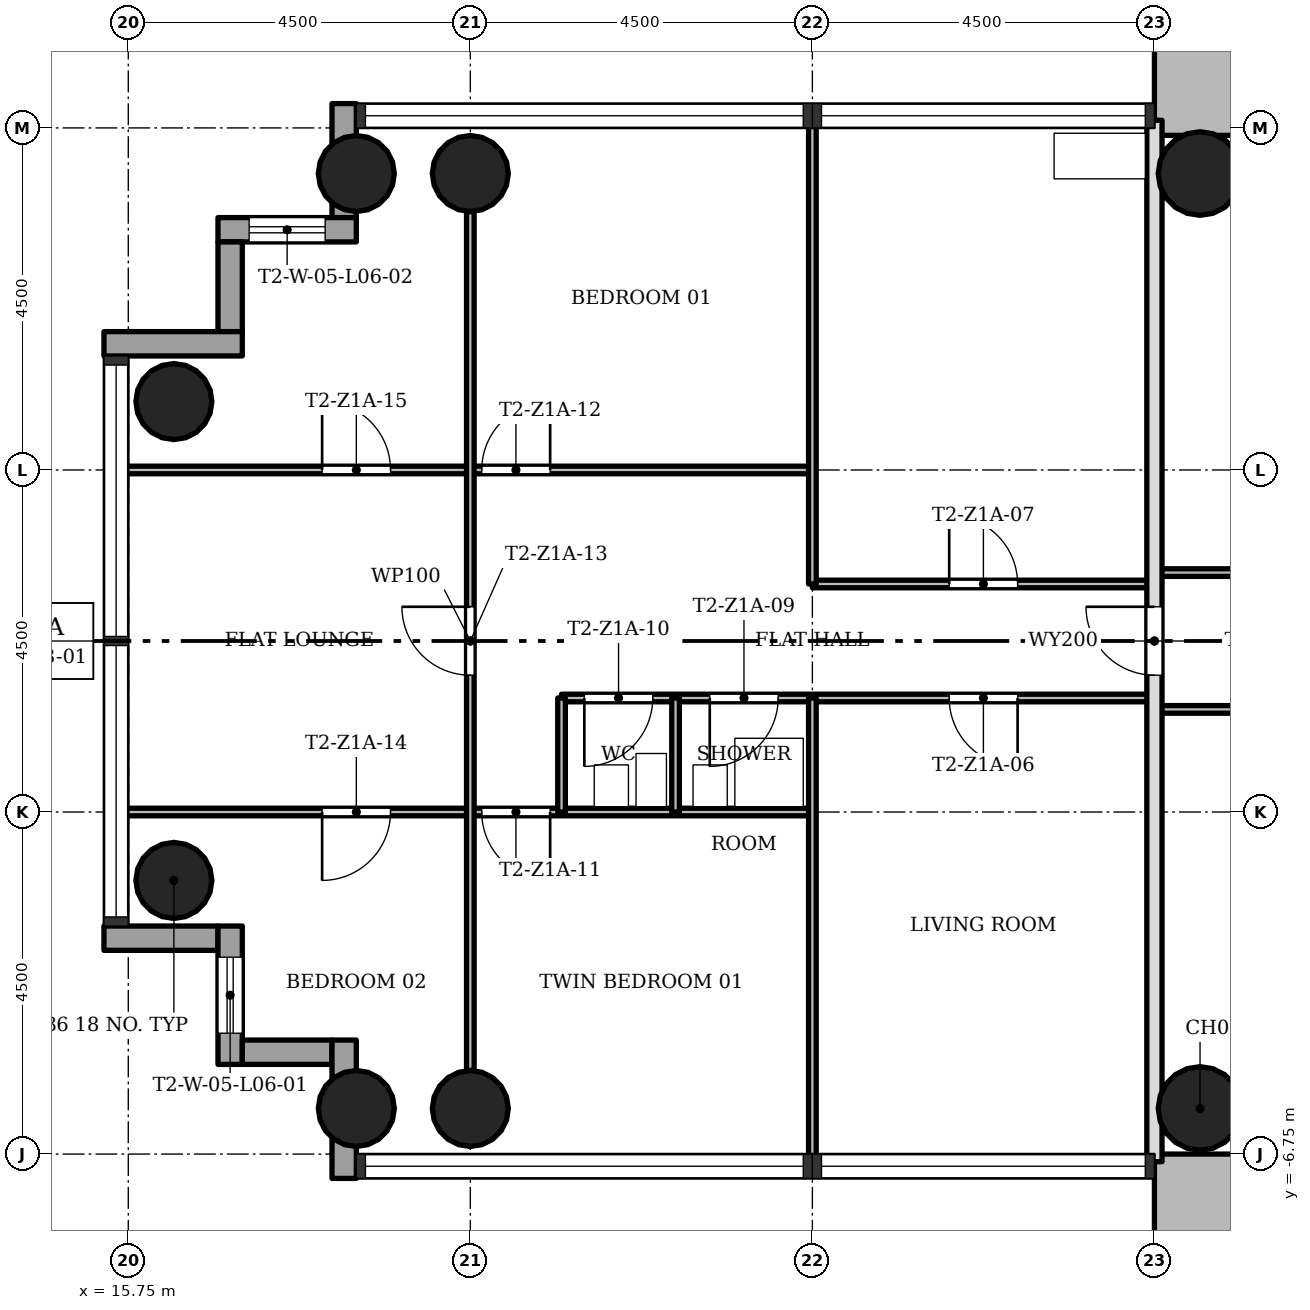
"""IFC4 building model, lengths in metres.
Left out: names, types, materials, properties, quantities, classifications, styles, units other than length and angle.
Written with IfcOpenShell. Run it as: python <this file> out.ifc"""

import sys

from ifc_helpers import new_model, si_unit, direction, frame, frame_2d, origin, origin_2d, place, context, subcontext, project, spatial, rectangle, hollow_circle, extrude, element, fill, save


model = new_model("IFC4")
c1 = context("Model", 3, precision=1e-05, world=origin(), true_north=direction((0.0, 1.0)))
c2 = subcontext(c1, "Body", "Model", "MODEL_VIEW")
j1 = project(units=[si_unit("LENGTHUNIT", "METRE"), si_unit("PLANEANGLEUNIT", "RADIAN")], contexts=[c1])
p1 = place(None, origin())
s1 = spatial("IfcSite", under=j1, at=p1, CompositionType="ELEMENT")
p2 = place(p1, origin())
s2 = spatial("IfcBuilding", under=s1, at=p2, CompositionType="ELEMENT")
p3 = place(p2, frame((0.0, 0.0, 27.9)))
s3 = spatial("IfcBuildingStorey", under=s2, at=p3, CompositionType="ELEMENT", Elevation=27.9)
p4 = place(p3, frame((29.8, 15.248, 0.0), z_axis=(0.0, 0.0, 1.0), x_axis=(0.0, -1.0, 0.0)))
e1 = element("IfcWall", 1, at=p4, inside=s3, PredefinedType="SHEAR", context=c2, shape_type="SweptSolid", body=[
    extrude(rectangle(XDim=8.596, YDim=1.1, at=frame_2d((4.298, 0.0))), origin(), (0.0, 0.0, 1.0), 3.4),
])
p5 = place(p3, frame((41.65, -7.3, 0.0), z_axis=(0.0, 0.0, 1.0), x_axis=(-1.0, 0.0, 0.0)))
e2 = element("IfcWall", 2, at=p5, inside=s3, PredefinedType="SHEAR", context=c2, shape_type="SweptSolid", body=[
    extrude(rectangle(XDim=12.4, YDim=1.1, at=frame_2d((6.2, 0.0))), origin(), (0.0, 0.0, 1.0), 3.4),
])
p6 = place(p5, frame((4.75, 0.0, 0.0)))
e3 = element("IfcOpeningElement", 3, at=p6, cuts=e2, PredefinedType="OPENING", context=c2, shape_type="SweptSolid", body=[
    extrude(rectangle(XDim=1.8, YDim=2.1, at=frame_2d((0.9, 1.05))), frame((0.0, 0.56, 0.0), z_axis=(0.0, -1.0, 0.0), x_axis=(1.0, 0.0, 0.0)), (0.0, 0.0, 1.0), 1.12),
])
for number, where, z_axis, x_axis in (
    (4, (20.25, 6.15, 0.0), (0.0, 0.0, 1.0), (1.0, 0.0, 0.0)),
    (5, (20.25, -6.15, 0.0), (0.0, 0.0, 1.0), (1.0, 0.0, 0.0)),
    (6, (18.75, 6.15, 0.0), (0.0, 0.0, 1.0), (1.0, 0.0, 0.0)),
    (7, (18.75, -6.15, 0.0), (0.0, 0.0, 1.0), (1.0, 0.0, 0.0)),
    (8, (16.35, 3.15, 0.0), (0.0, 0.0, 1.0), (1.0, 0.0, 0.0)),
    (9, (16.35, -3.15, 0.0), (0.0, 0.0, 1.0), (1.0, 0.0, 0.0)),
):
    element("IfcColumn", number, at=place(p3, frame(where, z_axis=z_axis, x_axis=x_axis)), inside=s3, PredefinedType="COLUMN", context=c2, shape_type="SweptSolid", body=[
        extrude(hollow_circle(Radius=0.5, WallThickness=0.036, at=origin_2d()), origin(), (0.0, 0.0, 1.0), 3.4),
    ])
for number, where, z_axis, x_axis in (
    (10, (29.85, 6.15, 0.0), (0.0, 0.0, 1.0), (1.0, 0.0, 0.0)),
    (11, (29.85, -6.15, 0.0), (0.0, 0.0, 1.0), (1.0, 0.0, 0.0)),
):
    element("IfcColumn", number, at=place(p3, frame(where, z_axis=z_axis, x_axis=x_axis)), inside=s3, PredefinedType="COLUMN", context=c2, shape_type="SweptSolid", body=[
        extrude(hollow_circle(Radius=0.55, WallThickness=0.04, at=origin_2d()), origin(), (0.0, 0.0, 1.0), 3.4),
    ])
p7 = place(p3, frame((18.59, 7.07, -0.3), z_axis=(0.0, 0.0, 1.0), x_axis=(0.0, -1.0, 0.0)))
e12 = element("IfcWall", 12, at=p7, inside=s3, PredefinedType="STANDARD", context=c2, shape_type="SweptSolid", body=[
    extrude(rectangle(XDim=1.5, YDim=0.32, at=frame_2d((0.75, 0.0))), origin(), (0.0, 0.0, 1.0), 3.4),
])
p8 = place(p3, frame((18.75, 5.41, -0.3), z_axis=(0.0, 0.0, 1.0), x_axis=(-1.0, 0.0, 0.0)))
e13 = element("IfcWall", 13, at=p8, inside=s3, PredefinedType="STANDARD", context=c2, shape_type="SweptSolid", body=[
    extrude(rectangle(XDim=1.82, YDim=0.32, at=frame_2d((0.91, 0.0))), origin(), (0.0, 0.0, 1.0), 3.4),
])
p9 = place(p8, frame((0.41, 0.0, 1.2)))
e14 = element("IfcOpeningElement", 14, at=p9, cuts=e13, PredefinedType="OPENING", context=c2, shape_type="SweptSolid", body=[
    extrude(rectangle(XDim=1.0, YDim=1.5, at=frame_2d((0.5, 0.75))), frame((0.0, 0.17, 0.0), z_axis=(0.0, -1.0, 0.0), x_axis=(1.0, 0.0, 0.0)), (0.0, 0.0, 1.0), 0.34),
])
p10 = place(p3, frame((17.09, 5.25, -0.3), z_axis=(0.0, 0.0, 1.0), x_axis=(0.0, -1.0, 0.0)))
e15 = element("IfcWall", 15, at=p10, inside=s3, PredefinedType="STANDARD", context=c2, shape_type="SweptSolid", body=[
    extrude(rectangle(XDim=1.18, YDim=0.32, at=frame_2d((0.59, 0.0))), origin(), (0.0, 0.0, 1.0), 3.4),
])
p11 = place(p3, frame((17.25, 3.91, -0.3), z_axis=(0.0, 0.0, 1.0), x_axis=(-1.0, 0.0, 0.0)))
e16 = element("IfcWall", 16, at=p11, inside=s3, PredefinedType="STANDARD", context=c2, shape_type="SweptSolid", body=[
    extrude(rectangle(XDim=1.82, YDim=0.32, at=frame_2d((0.91, 0.0))), origin(), (0.0, 0.0, 1.0), 3.4),
])
p12 = place(p3, frame((15.43, -3.91, -0.3), z_axis=(0.0, 0.0, 1.0), x_axis=(1.0, 0.0, 0.0)))
e17 = element("IfcWall", 17, at=p12, inside=s3, PredefinedType="STANDARD", context=c2, shape_type="SweptSolid", body=[
    extrude(rectangle(XDim=1.5, YDim=0.32, at=frame_2d((0.75, 0.0))), origin(), (0.0, 0.0, 1.0), 3.4),
])
p13 = place(p3, frame((17.09, -3.75, -0.3), z_axis=(0.0, 0.0, 1.0), x_axis=(0.0, -1.0, 0.0)))
e18 = element("IfcWall", 18, at=p13, inside=s3, PredefinedType="STANDARD", context=c2, shape_type="SweptSolid", body=[
    extrude(rectangle(XDim=1.82, YDim=0.32, at=frame_2d((0.91, 0.0))), origin(), (0.0, 0.0, 1.0), 3.4),
])
p14 = place(p13, frame((0.41, 0.0, 1.2)))
e19 = element("IfcOpeningElement", 19, at=p14, cuts=e18, PredefinedType="OPENING", context=c2, shape_type="SweptSolid", body=[
    extrude(rectangle(XDim=1.0, YDim=1.5, at=frame_2d((0.5, 0.75))), frame((0.0, 0.17, 0.0), z_axis=(0.0, -1.0, 0.0), x_axis=(1.0, 0.0, 0.0)), (0.0, 0.0, 1.0), 0.34),
])
p15 = place(p3, frame((17.25, -5.41, -0.3), z_axis=(0.0, 0.0, 1.0), x_axis=(1.0, 0.0, 0.0)))
e20 = element("IfcWall", 20, at=p15, inside=s3, PredefinedType="STANDARD", context=c2, shape_type="SweptSolid", body=[
    extrude(rectangle(XDim=1.18, YDim=0.32, at=frame_2d((0.59, 0.0))), origin(), (0.0, 0.0, 1.0), 3.4),
])
p16 = place(p3, frame((18.59, -5.25, -0.3), z_axis=(0.0, 0.0, 1.0), x_axis=(0.0, -1.0, 0.0)))
e21 = element("IfcWall", 21, at=p16, inside=s3, PredefinedType="STANDARD", context=c2, shape_type="SweptSolid", body=[
    extrude(rectangle(XDim=1.82, YDim=0.32, at=frame_2d((0.91, 0.0))), origin(), (0.0, 0.0, 1.0), 3.4),
])
p17 = place(p3, frame((24.75, -2.25, 0.0), z_axis=(0.0, 0.0, 1.0), x_axis=(-1.0, 0.0, 0.0)))
e22 = element("IfcWall", 22, at=p17, inside=s3, PredefinedType="PARTITIONING", context=c2, shape_type="SweptSolid", body=[
    extrude(rectangle(XDim=9.1, YDim=0.1, at=frame_2d((4.55, 0.0))), origin(), (0.0, 0.0, 1.0), 3.0),
])
p18 = place(p17, frame((3.45, 0.0, 0.0)))
e23 = element("IfcOpeningElement", 23, at=p18, cuts=e22, PredefinedType="OPENING", context=c2, shape_type="SweptSolid", body=[
    extrude(rectangle(XDim=0.9, YDim=2.1, at=frame_2d((0.45, 1.05))), frame((0.0, 0.06, 0.0), z_axis=(0.0, -1.0, 0.0), x_axis=(1.0, 0.0, 0.0)), (0.0, 0.0, 1.0), 0.12),
])
p19 = place(p17, frame((5.55, 0.0, 0.0)))
e24 = element("IfcOpeningElement", 24, at=p19, cuts=e22, PredefinedType="OPENING", context=c2, shape_type="SweptSolid", body=[
    extrude(rectangle(XDim=0.9, YDim=2.1, at=frame_2d((0.45, 1.05))), frame((0.0, 0.06, 0.0), z_axis=(0.0, -1.0, 0.0), x_axis=(1.0, 0.0, 0.0)), (0.0, 0.0, 1.0), 0.12),
])
p20 = place(p3, frame((34.5, -0.9, 0.0), z_axis=(0.0, 0.0, 1.0), x_axis=(-1.0, 0.0, 0.0)))
e25 = element("IfcWall", 25, at=p20, inside=s3, PredefinedType="PARTITIONING", context=c2, shape_type="SweptSolid", body=[
    extrude(rectangle(XDim=5.25, YDim=0.1, at=frame_2d((2.625, 0.0))), origin(), (0.0, 0.0, 1.0), 3.0),
])
p21 = place(p3, frame((29.25, -0.75, 0.0), z_axis=(0.0, 0.0, 1.0), x_axis=(-1.0, 0.0, 0.0)))
e26 = element("IfcWall", 26, at=p21, inside=s3, PredefinedType="PARTITIONING", context=c2, shape_type="SweptSolid", body=[
    extrude(rectangle(XDim=7.8, YDim=0.1, at=frame_2d((3.9, 0.0))), origin(), (0.0, 0.0, 1.0), 3.0),
])
p22 = place(p21, frame((1.8, 0.0, 0.0)))
e27 = element("IfcOpeningElement", 27, at=p22, cuts=e26, PredefinedType="OPENING", context=c2, shape_type="SweptSolid", body=[
    extrude(rectangle(XDim=0.9, YDim=2.1, at=frame_2d((0.45, 1.05))), frame((0.0, 0.06, 0.0), z_axis=(0.0, -1.0, 0.0), x_axis=(1.0, 0.0, 0.0)), (0.0, 0.0, 1.0), 0.12),
])
p23 = place(p21, frame((4.95, 0.0, 0.0)))
e28 = element("IfcOpeningElement", 28, at=p23, cuts=e26, PredefinedType="OPENING", context=c2, shape_type="SweptSolid", body=[
    extrude(rectangle(XDim=0.9, YDim=2.1, at=frame_2d((0.45, 1.05))), frame((0.0, 0.06, 0.0), z_axis=(0.0, -1.0, 0.0), x_axis=(1.0, 0.0, 0.0)), (0.0, 0.0, 1.0), 0.12),
])
p24 = place(p21, frame((6.6, 0.0, 0.0)))
e29 = element("IfcOpeningElement", 29, at=p24, cuts=e26, PredefinedType="OPENING", context=c2, shape_type="SweptSolid", body=[
    extrude(rectangle(XDim=0.9, YDim=2.1, at=frame_2d((0.45, 1.05))), frame((0.0, 0.06, 0.0), z_axis=(0.0, -1.0, 0.0), x_axis=(1.0, 0.0, 0.0)), (0.0, 0.0, 1.0), 0.12),
])
p25 = place(p3, frame((29.25, 0.75, 0.0), z_axis=(0.0, 0.0, 1.0), x_axis=(-1.0, 0.0, 0.0)))
e30 = element("IfcWall", 30, at=p25, inside=s3, PredefinedType="PARTITIONING", context=c2, shape_type="SweptSolid", body=[
    extrude(rectangle(XDim=4.5, YDim=0.1, at=frame_2d((2.25, 0.0))), origin(), (0.0, 0.0, 1.0), 3.0),
])
p26 = place(p25, frame((1.8, 0.0, 0.0)))
e31 = element("IfcOpeningElement", 31, at=p26, cuts=e30, PredefinedType="OPENING", context=c2, shape_type="SweptSolid", body=[
    extrude(rectangle(XDim=0.9, YDim=2.1, at=frame_2d((0.45, 1.05))), frame((0.0, 0.06, 0.0), z_axis=(0.0, -1.0, 0.0), x_axis=(1.0, 0.0, 0.0)), (0.0, 0.0, 1.0), 0.12),
])
p27 = place(p3, frame((34.5, 0.9, 0.0), z_axis=(0.0, 0.0, 1.0), x_axis=(-1.0, 0.0, 0.0)))
e32 = element("IfcWall", 32, at=p27, inside=s3, PredefinedType="PARTITIONING", context=c2, shape_type="SweptSolid", body=[
    extrude(rectangle(XDim=5.25, YDim=0.1, at=frame_2d((2.625, 0.0))), origin(), (0.0, 0.0, 1.0), 3.0),
])
p28 = place(p3, frame((24.75, 2.25, 0.0), z_axis=(0.0, 0.0, 1.0), x_axis=(-1.0, 0.0, 0.0)))
e33 = element("IfcWall", 33, at=p28, inside=s3, PredefinedType="PARTITIONING", context=c2, shape_type="SweptSolid", body=[
    extrude(rectangle(XDim=9.1, YDim=0.1, at=frame_2d((4.55, 0.0))), origin(), (0.0, 0.0, 1.0), 3.0),
])
p29 = place(p28, frame((3.45, 0.0, 0.0)))
e34 = element("IfcOpeningElement", 34, at=p29, cuts=e33, PredefinedType="OPENING", context=c2, shape_type="SweptSolid", body=[
    extrude(rectangle(XDim=0.9, YDim=2.1, at=frame_2d((0.45, 1.05))), frame((0.0, 0.06, 0.0), z_axis=(0.0, -1.0, 0.0), x_axis=(1.0, 0.0, 0.0)), (0.0, 0.0, 1.0), 0.12),
])
p30 = place(p28, frame((5.55, 0.0, 0.0)))
e35 = element("IfcOpeningElement", 35, at=p30, cuts=e33, PredefinedType="OPENING", context=c2, shape_type="SweptSolid", body=[
    extrude(rectangle(XDim=0.9, YDim=2.1, at=frame_2d((0.45, 1.05))), frame((0.0, 0.06, 0.0), z_axis=(0.0, -1.0, 0.0), x_axis=(1.0, 0.0, 0.0)), (0.0, 0.0, 1.0), 0.12),
])
p31 = place(p3, frame((29.25, -6.85, 0.0), z_axis=(0.0, 0.0, 1.0), x_axis=(0.0, 1.0, 0.0)))
e36 = element("IfcWall", 36, at=p31, inside=s3, PredefinedType="SOLIDWALL", context=c2, shape_type="SweptSolid", body=[
    extrude(rectangle(XDim=13.7, YDim=0.2, at=frame_2d((6.85, 0.0))), origin(), (0.0, 0.0, 1.0), 3.0),
])
p32 = place(p31, frame((6.4, 0.0, 0.0)))
e37 = element("IfcOpeningElement", 37, at=p32, cuts=e36, PredefinedType="OPENING", context=c2, shape_type="SweptSolid", body=[
    extrude(rectangle(XDim=0.9, YDim=2.1, at=frame_2d((0.45, 1.05))), frame((0.0, 0.11, 0.0), z_axis=(0.0, -1.0, 0.0), x_axis=(1.0, 0.0, 0.0)), (0.0, 0.0, 1.0), 0.22),
])
for number, where, z_axis, x_axis in (
    (38, (24.75, -6.85, 0.0), (0.0, 0.0, 1.0), (0.0, 1.0, 0.0)),
    (39, (24.75, 0.75, 0.0), (0.0, 0.0, 1.0), (0.0, 1.0, 0.0)),
):
    element("IfcWall", number, at=place(p3, frame(where, z_axis=z_axis, x_axis=x_axis)), inside=s3, PredefinedType="PARTITIONING", context=c2, shape_type="SweptSolid", body=[
        extrude(rectangle(XDim=6.1, YDim=0.1, at=frame_2d((3.05, 0.0))), origin(), (0.0, 0.0, 1.0), 3.0),
    ])
for number, where, z_axis, x_axis in (
    (40, (22.95, -2.25, 0.0), (0.0, 0.0, 1.0), (0.0, 1.0, 0.0)),
    (41, (21.45, -2.25, 0.0), (0.0, 0.0, 1.0), (0.0, 1.0, 0.0)),
):
    element("IfcWall", number, at=place(p3, frame(where, z_axis=z_axis, x_axis=x_axis)), inside=s3, PredefinedType="PARTITIONING", context=c2, shape_type="SweptSolid", body=[
        extrude(rectangle(XDim=1.5, YDim=0.1, at=frame_2d((0.75, 0.0))), origin(), (0.0, 0.0, 1.0), 3.0),
    ])
p33 = place(p3, frame((20.25, -5.65, 0.0), z_axis=(0.0, 0.0, 1.0), x_axis=(0.0, 1.0, 0.0)))
e42 = element("IfcWall", 42, at=p33, inside=s3, PredefinedType="PARTITIONING", context=c2, shape_type="SweptSolid", body=[
    extrude(rectangle(XDim=11.3, YDim=0.1, at=frame_2d((5.65, 0.0))), origin(), (0.0, 0.0, 1.0), 3.0),
])
p34 = place(p33, frame((5.2, 0.0, 0.0)))
e43 = element("IfcOpeningElement", 43, at=p34, cuts=e42, PredefinedType="OPENING", context=c2, shape_type="SweptSolid", body=[
    extrude(rectangle(XDim=0.9, YDim=2.1, at=frame_2d((0.45, 1.05))), frame((0.0, 0.06, 0.0), z_axis=(0.0, -1.0, 0.0), x_axis=(1.0, 0.0, 0.0)), (0.0, 0.0, 1.0), 0.12),
])
p35 = place(p22, origin())
e44 = element("IfcDoor", 44, at=p35, inside=s3, OperationType="SINGLE_SWING_RIGHT", PredefinedType="DOOR", context=c2, shape_type="SweptSolid", body=[
    extrude(rectangle(XDim=0.9, YDim=2.1, at=frame_2d((0.45, 1.05))), frame((0.0, 0.025, 0.0), z_axis=(0.0, -1.0, 0.0), x_axis=(1.0, 0.0, 0.0)), (0.0, 0.0, 1.0), 0.05),
])
fill(e27, e44)
p36 = place(p26, origin())
e45 = element("IfcDoor", 45, at=p36, inside=s3, OperationType="SINGLE_SWING_RIGHT", PredefinedType="DOOR", context=c2, shape_type="SweptSolid", body=[
    extrude(rectangle(XDim=0.9, YDim=2.1, at=frame_2d((0.45, 1.05))), frame((0.0, 0.025, 0.0), z_axis=(0.0, -1.0, 0.0), x_axis=(1.0, 0.0, 0.0)), (0.0, 0.0, 1.0), 0.05),
])
fill(e31, e45)
p37 = place(p32, origin())
e46 = element("IfcDoor", 46, at=p37, inside=s3, OperationType="SINGLE_SWING_LEFT", PredefinedType="DOOR", context=c2, shape_type="SweptSolid", body=[
    extrude(rectangle(XDim=0.9, YDim=2.1, at=frame_2d((0.45, 1.05))), frame((0.0, 0.025, 0.0), z_axis=(0.0, -1.0, 0.0), x_axis=(1.0, 0.0, 0.0)), (0.0, 0.0, 1.0), 0.05),
])
fill(e37, e46)
p38 = place(p23, origin())
e47 = element("IfcDoor", 47, at=p38, inside=s3, OperationType="SINGLE_SWING_LEFT", PredefinedType="DOOR", context=c2, shape_type="SweptSolid", body=[
    extrude(rectangle(XDim=0.9, YDim=2.1, at=frame_2d((0.45, 1.05))), frame((0.0, 0.025, 0.0), z_axis=(0.0, -1.0, 0.0), x_axis=(1.0, 0.0, 0.0)), (0.0, 0.0, 1.0), 0.05),
])
fill(e28, e47)
p39 = place(p24, origin())
e48 = element("IfcDoor", 48, at=p39, inside=s3, OperationType="SINGLE_SWING_LEFT", PredefinedType="DOOR", context=c2, shape_type="SweptSolid", body=[
    extrude(rectangle(XDim=0.9, YDim=2.1, at=frame_2d((0.45, 1.05))), frame((0.0, 0.025, 0.0), z_axis=(0.0, -1.0, 0.0), x_axis=(1.0, 0.0, 0.0)), (0.0, 0.0, 1.0), 0.05),
])
fill(e29, e48)
p40 = place(p18, origin())
e49 = element("IfcDoor", 49, at=p40, inside=s3, OperationType="SINGLE_SWING_RIGHT", PredefinedType="DOOR", context=c2, shape_type="SweptSolid", body=[
    extrude(rectangle(XDim=0.9, YDim=2.1, at=frame_2d((0.45, 1.05))), frame((0.0, 0.025, 0.0), z_axis=(0.0, -1.0, 0.0), x_axis=(1.0, 0.0, 0.0)), (0.0, 0.0, 1.0), 0.05),
])
fill(e23, e49)
p41 = place(p29, origin())
e50 = element("IfcDoor", 50, at=p41, inside=s3, OperationType="SINGLE_SWING_LEFT", PredefinedType="DOOR", context=c2, shape_type="SweptSolid", body=[
    extrude(rectangle(XDim=0.9, YDim=2.1, at=frame_2d((0.45, 1.05))), frame((0.0, 0.025, 0.0), z_axis=(0.0, -1.0, 0.0), x_axis=(1.0, 0.0, 0.0)), (0.0, 0.0, 1.0), 0.05),
])
fill(e34, e50)
p42 = place(p34, origin())
e51 = element("IfcDoor", 51, at=p42, inside=s3, OperationType="SINGLE_SWING_LEFT", PredefinedType="DOOR", context=c2, shape_type="SweptSolid", body=[
    extrude(rectangle(XDim=0.9, YDim=2.1, at=frame_2d((0.45, 1.05))), frame((0.0, 0.025, 0.0), z_axis=(0.0, -1.0, 0.0), x_axis=(1.0, 0.0, 0.0)), (0.0, 0.0, 1.0), 0.05),
])
fill(e43, e51)
p43 = place(p19, origin())
e52 = element("IfcDoor", 52, at=p43, inside=s3, OperationType="SINGLE_SWING_LEFT", PredefinedType="DOOR", context=c2, shape_type="SweptSolid", body=[
    extrude(rectangle(XDim=0.9, YDim=2.1, at=frame_2d((0.45, 1.05))), frame((0.0, 0.025, 0.0), z_axis=(0.0, -1.0, 0.0), x_axis=(1.0, 0.0, 0.0)), (0.0, 0.0, 1.0), 0.05),
])
fill(e24, e52)
p44 = place(p30, origin())
e53 = element("IfcDoor", 53, at=p44, inside=s3, OperationType="SINGLE_SWING_RIGHT", PredefinedType="DOOR", context=c2, shape_type="SweptSolid", body=[
    extrude(rectangle(XDim=0.9, YDim=2.1, at=frame_2d((0.45, 1.05))), frame((0.0, 0.025, 0.0), z_axis=(0.0, -1.0, 0.0), x_axis=(1.0, 0.0, 0.0)), (0.0, 0.0, 1.0), 0.05),
])
fill(e35, e53)
p45 = place(p14, origin())
e54 = element("IfcWindow", 54, at=p45, inside=s3, PartitioningType="SINGLE_PANEL", PredefinedType="WINDOW", context=c2, shape_type="SweptSolid", body=[
    extrude(rectangle(XDim=1.0, YDim=1.5, at=frame_2d((0.5, 0.75))), frame((0.0, 0.03, 0.0), z_axis=(0.0, -1.0, 0.0), x_axis=(1.0, 0.0, 0.0)), (0.0, 0.0, 1.0), 0.06),
])
fill(e19, e54)
p46 = place(p9, origin())
e55 = element("IfcWindow", 55, at=p46, inside=s3, PartitioningType="SINGLE_PANEL", PredefinedType="WINDOW", context=c2, shape_type="SweptSolid", body=[
    extrude(rectangle(XDim=1.0, YDim=1.5, at=frame_2d((0.5, 0.75))), frame((0.0, 0.03, 0.0), z_axis=(0.0, -1.0, 0.0), x_axis=(1.0, 0.0, 0.0)), (0.0, 0.0, 1.0), 0.06),
])
fill(e14, e55)
save(model, sys.argv[1])
